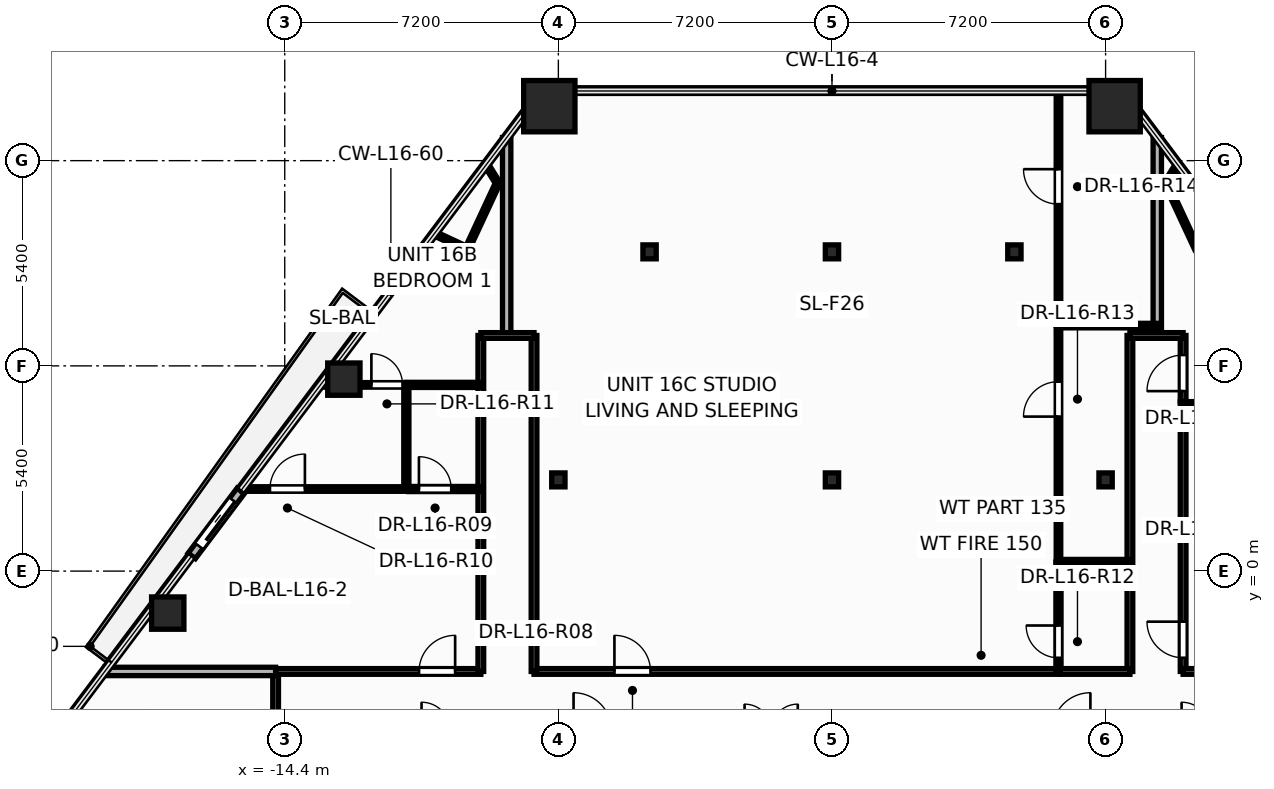
"""IFC4 building model, lengths in metres.
Left out: names, types, materials, properties, quantities, classifications, styles, units other than length and angle.
Written with IfcOpenShell. Run it as: python <this file> out.ifc"""

import sys

from ifc_helpers import new_model, si_unit, direction, frame, frame_2d, origin, origin_2d, place, context, subcontext, project, spatial, rectangle, hollow_rectangle, hollow_circle, i_section, extrude, element, fill, save


model = new_model("IFC4")
c1 = context("Model", 3, precision=1e-05, world=origin(), true_north=direction((0.0, 1.0)))
c2 = subcontext(c1, "Body", "Model", "MODEL_VIEW")
j1 = project(units=[si_unit("LENGTHUNIT", "METRE"), si_unit("PLANEANGLEUNIT", "RADIAN")], contexts=[c1])
p1 = place(None, origin())
s1 = spatial("IfcSite", under=j1, at=p1, CompositionType="ELEMENT")
p2 = place(p1, origin())
s2 = spatial("IfcBuilding", under=s1, at=p2, CompositionType="ELEMENT")
p3 = place(p2, frame((0.0, 0.0, 64.8)))
s3 = spatial("IfcBuildingStorey", under=s2, at=p3, CompositionType="ELEMENT", Elevation=64.8)
for number, where, z_axis, x_axis in (
    (1, (7.438, 12.233, 0.0), (0.0, 0.0, 1.0), (1.0, 0.0, 0.0)),
    (2, (-7.438, 12.233, 0.0), (0.0, 0.0, 1.0), (1.0, 0.0, 0.0)),
):
    element("IfcColumn", number, at=place(p3, frame(where, z_axis=z_axis, x_axis=x_axis)), inside=s3, PredefinedType="COLUMN", context=c2, shape_type="SweptSolid", body=[
        extrude(hollow_rectangle(XDim=1.35, YDim=1.35, WallThickness=0.065, at=origin_2d()), origin(), (0.0, 0.0, 1.0), 3.6),
    ])
for number, where, z_axis, x_axis in (
    (3, (-12.844, 5.051, 0.0), (0.0, 0.0, 1.0), (1.0, 0.0, 0.0)),
    (4, (-17.479, -1.104, 0.0), (0.0, 0.0, 1.0), (1.0, 0.0, 0.0)),
):
    element("IfcColumn", number, at=place(p3, frame(where, z_axis=z_axis, x_axis=x_axis)), inside=s3, PredefinedType="COLUMN", context=c2, shape_type="SweptSolid", body=[
        extrude(hollow_circle(Radius=0.425, WallThickness=0.038, at=origin_2d()), origin(), (0.0, 0.0, 1.0), 3.6),
    ])
for number, where, z_axis, x_axis in (
    (5, (-7.2, 2.4, 0.0), (0.0, 0.0, 1.0), (1.0, 0.0, 0.0)),
    (6, (0.0, 2.4, 0.0), (0.0, 0.0, 1.0), (1.0, 0.0, 0.0)),
    (7, (7.2, 2.4, 0.0), (0.0, 0.0, 1.0), (1.0, 0.0, 0.0)),
    (8, (-4.8, 8.4, 0.0), (0.0, 0.0, 1.0), (1.0, 0.0, 0.0)),
    (9, (0.0, 8.4, 0.0), (0.0, 0.0, 1.0), (1.0, 0.0, 0.0)),
    (10, (4.8, 8.4, 0.0), (0.0, 0.0, 1.0), (1.0, 0.0, 0.0)),
):
    element("IfcColumn", number, at=place(p3, frame(where, z_axis=z_axis, x_axis=x_axis)), inside=s3, PredefinedType="COLUMN", context=c2, shape_type="SweptSolid", body=[
        extrude(i_section(OverallWidth=0.35, OverallDepth=0.367, WebThickness=0.025, FlangeThickness=0.032, at=origin_2d()), origin(), (0.0, 0.0, 1.0), 3.6),
    ])
p4 = place(p3, frame((-15.559, 2.11, -0.015), z_axis=(0.0, 0.0, 1.0), x_axis=(-0.601441023505, -0.798917201746, 0.0)))
e11 = element("IfcWall", 11, at=p4, inside=s3, PredefinedType="STANDARD", context=c2, shape_type="SweptSolid", body=[
    extrude(rectangle(XDim=2.14, YDim=0.24, at=frame_2d((1.07, 0.0))), origin(), (0.0, 0.0, 1.0), 2.729),
])
p5 = place(p4, frame((0.32, 0.0, 0.015)))
e12 = element("IfcOpeningElement", 12, at=p5, cuts=e11, PredefinedType="OPENING", context=c2, shape_type="SweptSolid", body=[
    extrude(rectangle(XDim=1.506, YDim=2.204, at=frame_2d((0.75, 1.102))), frame((0.0, 0.13, 0.0), z_axis=(0.0, -1.0, 0.0), x_axis=(1.0, 0.0, 0.0)), (0.0, 0.0, 1.0), 0.26),
])
p6 = place(p3, frame((-7.84, -2.64, 0.0), z_axis=(0.0, 0.0, 1.0), x_axis=(1.0, 0.0, 0.0)))
e13 = element("IfcWall", 13, at=p6, inside=s3, PredefinedType="PARTITIONING", context=c2, shape_type="SweptSolid", body=[
    extrude(rectangle(XDim=13.84, YDim=0.15, at=frame_2d((6.92, 0.0))), origin(), (0.0, 0.0, 1.0), 2.325),
])
p7 = place(p6, frame((2.115, 0.0, 0.0)))
e14 = element("IfcOpeningElement", 14, at=p7, cuts=e13, PredefinedType="OPENING", context=c2, shape_type="SweptSolid", body=[
    extrude(rectangle(XDim=0.956, YDim=2.104, at=frame_2d((0.475, 1.052))), frame((0.0, 0.085, 0.0), z_axis=(0.0, -1.0, 0.0), x_axis=(1.0, 0.0, 0.0)), (0.0, 0.0, 1.0), 0.17),
])
p8 = place(p3, frame((-7.84, -2.64, 0.0), z_axis=(0.0, 0.0, 1.0), x_axis=(0.0, 1.0, 0.0)))
e15 = element("IfcWall", 15, at=p8, inside=s3, PredefinedType="PARTITIONING", context=c2, shape_type="SweptSolid", body=[
    extrude(rectangle(XDim=8.84, YDim=0.15, at=frame_2d((4.42, 0.0))), origin(), (0.0, 0.0, 1.0), 2.325),
])
p9 = place(p3, frame((9.24, -2.64, 0.0), z_axis=(0.0, 0.0, 1.0), x_axis=(0.0, 1.0, 0.0)))
e16 = element("IfcWall", 16, at=p9, inside=s3, PredefinedType="PARTITIONING", context=c2, shape_type="SweptSolid", body=[
    extrude(rectangle(XDim=7.1, YDim=0.15, at=frame_2d((3.55, 0.0))), origin(), (0.0, 0.0, 1.0), 2.325),
])
p10 = place(p9, frame((0.36, 0.0, 0.0)))
e17 = element("IfcOpeningElement", 17, at=p10, cuts=e16, PredefinedType="OPENING", context=c2, shape_type="SweptSolid", body=[
    extrude(rectangle(XDim=0.956, YDim=2.104, at=frame_2d((0.475, 1.052))), frame((0.0, 0.085, 0.0), z_axis=(0.0, -1.0, 0.0), x_axis=(1.0, 0.0, 0.0)), (0.0, 0.0, 1.0), 0.17),
])
p11 = place(p3, frame((-14.64, -9.66, 0.0), z_axis=(0.0, 0.0, 1.0), x_axis=(0.0, 1.0, 0.0)))
e18 = element("IfcWall", 18, at=p11, inside=s3, PredefinedType="PARTITIONING", context=c2, shape_type="SweptSolid", body=[
    extrude(rectangle(XDim=7.02, YDim=0.15, at=frame_2d((3.51, 0.0))), origin(), (0.0, 0.0, 1.0), 2.325),
])
p12 = place(p11, frame((0.399, 0.0, 0.0)))
e19 = element("IfcOpeningElement", 19, at=p12, cuts=e18, PredefinedType="OPENING", context=c2, shape_type="SweptSolid", body=[
    extrude(rectangle(XDim=0.956, YDim=2.104, at=frame_2d((0.475, 1.052))), frame((0.0, 0.085, 0.0), z_axis=(0.0, -1.0, 0.0), x_axis=(1.0, 0.0, 0.0)), (0.0, 0.0, 1.0), 0.17),
])
p13 = place(p3, frame((5.96, 0.24, 0.0), z_axis=(0.0, 0.0, 1.0), x_axis=(0.0, 1.0, 0.0)))
e20 = element("IfcWall", 20, at=p13, inside=s3, PredefinedType="PARTITIONING", context=c2, shape_type="SweptSolid", body=[
    extrude(rectangle(XDim=6.22, YDim=0.12, at=frame_2d((3.11, 0.0))), origin(), (0.0, 0.0, 1.0), 2.325),
])
p14 = place(p13, frame((3.825, 0.0, 0.0)))
e21 = element("IfcOpeningElement", 21, at=p14, cuts=e20, PredefinedType="OPENING", context=c2, shape_type="SweptSolid", body=[
    extrude(rectangle(XDim=0.926, YDim=2.104, at=frame_2d((0.46, 1.052))), frame((0.0, 0.07, 0.0), z_axis=(0.0, -1.0, 0.0), x_axis=(1.0, 0.0, 0.0)), (0.0, 0.0, 1.0), 0.14),
])
p15 = place(p3, frame((5.96, 6.46, 0.0), z_axis=(0.0, 0.0, 1.0), x_axis=(0.0, 1.0, 0.0)))
e22 = element("IfcWall", 22, at=p15, inside=s3, PredefinedType="PARTITIONING", context=c2, shape_type="SweptSolid", body=[
    extrude(rectangle(XDim=6.173, YDim=0.12, at=frame_2d((3.087, 0.0))), origin(), (0.0, 0.0, 1.0), 2.325),
])
p16 = place(p15, frame((3.196, 0.0, 0.0)))
e23 = element("IfcOpeningElement", 23, at=p16, cuts=e22, PredefinedType="OPENING", context=c2, shape_type="SweptSolid", body=[
    extrude(rectangle(XDim=0.926, YDim=2.104, at=frame_2d((0.46, 1.052))), frame((0.0, 0.07, 0.0), z_axis=(0.0, -1.0, 0.0), x_axis=(1.0, 0.0, 0.0)), (0.0, 0.0, 1.0), 0.14),
])
p17 = place(p3, frame((7.84, -2.64, 0.0), z_axis=(0.0, 0.0, 1.0), x_axis=(0.0, 1.0, 0.0)))
e24 = element("IfcWall", 24, at=p17, inside=s3, PredefinedType="PARTITIONING", context=c2, shape_type="SweptSolid", body=[
    extrude(rectangle(XDim=8.84, YDim=0.15, at=frame_2d((4.42, 0.0))), origin(), (0.0, 0.0, 1.0), 2.325),
])
p18 = place(p3, frame((-14.64, -2.64, 0.0), z_axis=(0.0, 0.0, 1.0), x_axis=(1.0, 0.0, 0.0)))
e25 = element("IfcWall", 25, at=p18, inside=s3, PredefinedType="PARTITIONING", context=c2, shape_type="SweptSolid", body=[
    extrude(rectangle(XDim=5.4, YDim=0.15, at=frame_2d((2.7, 0.0))), origin(), (0.0, 0.0, 1.0), 3.35),
])
p19 = place(p18, frame((3.774, 0.0, 0.0)))
e26 = element("IfcOpeningElement", 26, at=p19, cuts=e25, PredefinedType="OPENING", context=c2, shape_type="SweptSolid", body=[
    extrude(rectangle(XDim=0.956, YDim=2.104, at=frame_2d((0.475, 1.052))), frame((0.0, 0.085, 0.0), z_axis=(0.0, -1.0, 0.0), x_axis=(1.0, 0.0, 0.0)), (0.0, 0.0, 1.0), 0.17),
])
for number, where, z_axis, x_axis in (
    (27, (-8.56, 6.2, 0.0), (0.0, 0.0, 1.0), (0.0, 1.0, 0.0)),
    (28, (8.56, 6.2, 0.0), (0.0, 0.0, 1.0), (0.0, 1.0, 0.0)),
):
    element("IfcWall", number, at=place(p3, frame(where, z_axis=z_axis, x_axis=x_axis)), inside=s3, PredefinedType="PARTITIONING", context=c2, shape_type="SweptSolid", body=[
        extrude(rectangle(XDim=5.208, YDim=0.22, at=frame_2d((2.604, 0.0))), origin(), (0.0, 0.0, 1.0), 2.325),
    ])
p20 = place(p3, frame((-9.24, -2.64, 0.0), z_axis=(0.0, 0.0, 1.0), x_axis=(0.0, 1.0, 0.0)))
e29 = element("IfcWall", 29, at=p20, inside=s3, PredefinedType="PARTITIONING", context=c2, shape_type="SweptSolid", body=[
    extrude(rectangle(XDim=8.84, YDim=0.15, at=frame_2d((4.42, 0.0))), origin(), (0.0, 0.0, 1.0), 2.325),
])
p21 = place(p3, frame((9.24, 4.4, 0.0), z_axis=(0.0, 0.0, 1.0), x_axis=(1.0, 0.0, 0.0)))
e30 = element("IfcWall", 30, at=p21, inside=s3, PredefinedType="PARTITIONING", context=c2, shape_type="SweptSolid", body=[
    extrude(rectangle(XDim=4.595, YDim=0.12, at=frame_2d((2.298, 0.0))), origin(), (0.0, 0.0, 1.0), 2.713),
])
p22 = place(p3, frame((-19.135, -2.64, 0.0), z_axis=(0.0, 0.0, 1.0), x_axis=(1.0, 0.0, 0.0)))
e31 = element("IfcWall", 31, at=p22, inside=s3, PredefinedType="PARTITIONING", context=c2, shape_type="SweptSolid", body=[
    extrude(rectangle(XDim=4.495, YDim=0.22, at=frame_2d((2.248, 0.0))), origin(), (0.0, 0.0, 1.0), 2.713),
])
p23 = place(p3, frame((-15.522, 2.16, 0.0), z_axis=(0.0, 0.0, 1.0), x_axis=(1.0, 0.0, 0.0)))
e32 = element("IfcWall", 32, at=p23, inside=s3, PredefinedType="PARTITIONING", context=c2, shape_type="SweptSolid", body=[
    extrude(rectangle(XDim=4.382, YDim=0.12, at=frame_2d((2.191, 0.0))), origin(), (0.0, 0.0, 1.0), 2.713),
])
p24 = place(p23, frame((0.732, 0.0, 0.0)))
e33 = element("IfcOpeningElement", 33, at=p24, cuts=e32, PredefinedType="OPENING", context=c2, shape_type="SweptSolid", body=[
    extrude(rectangle(XDim=0.926, YDim=2.104, at=frame_2d((0.46, 1.052))), frame((0.0, 0.07, 0.0), z_axis=(0.0, -1.0, 0.0), x_axis=(1.0, 0.0, 0.0)), (0.0, 0.0, 1.0), 0.14),
])
p25 = place(p3, frame((9.24, -2.64, 0.0), z_axis=(0.0, 0.0, 1.0), x_axis=(1.0, 0.0, 0.0)))
e34 = element("IfcWall", 34, at=p25, inside=s3, PredefinedType="PARTITIONING", context=c2, shape_type="SweptSolid", body=[
    extrude(rectangle(XDim=3.26, YDim=0.15, at=frame_2d((1.63, 0.0))), origin(), (0.0, 0.0, 1.0), 3.35),
])
p26 = place(p3, frame((5.96, -2.64, 0.0), z_axis=(0.0, 0.0, 1.0), x_axis=(0.0, 1.0, 0.0)))
e35 = element("IfcWall", 35, at=p26, inside=s3, PredefinedType="PARTITIONING", context=c2, shape_type="SweptSolid", body=[
    extrude(rectangle(XDim=2.88, YDim=0.135, at=frame_2d((1.44, 0.0))), origin(), (0.0, 0.0, 1.0), 3.35),
])
p27 = place(p26, frame((0.359, 0.0, 0.0)))
e36 = element("IfcOpeningElement", 36, at=p27, cuts=e35, PredefinedType="OPENING", context=c2, shape_type="SweptSolid", body=[
    extrude(rectangle(XDim=0.856, YDim=2.104, at=frame_2d((0.425, 1.052))), frame((0.0, 0.078, 0.0), z_axis=(0.0, -1.0, 0.0), x_axis=(1.0, 0.0, 0.0)), (0.0, 0.0, 1.0), 0.155),
])
p28 = place(p3, frame((-11.2, 2.16, 0.0), z_axis=(0.0, 0.0, 1.0), x_axis=(0.0, 1.0, 0.0)))
e37 = element("IfcWall", 37, at=p28, inside=s3, PredefinedType="PARTITIONING", context=c2, shape_type="SweptSolid", body=[
    extrude(rectangle(XDim=2.74, YDim=0.135, at=frame_2d((1.37, 0.0))), origin(), (0.0, 0.0, 1.0), 3.35),
])
p29 = place(p3, frame((5.96, 6.46, 0.0), z_axis=(0.0, 0.0, 1.0), x_axis=(1.0, 0.0, 0.0)))
e38 = element("IfcWall", 38, at=p29, inside=s3, PredefinedType="PARTITIONING", context=c2, shape_type="SweptSolid", body=[
    extrude(rectangle(XDim=2.6, YDim=0.12, at=frame_2d((1.3, 0.0))), origin(), (0.0, 0.0, 1.0), 3.35),
])
p30 = place(p3, frame((-13.459, 4.9, 0.0), z_axis=(0.0, 0.0, 1.0), x_axis=(1.0, 0.0, 0.0)))
e39 = element("IfcWall", 39, at=p30, inside=s3, PredefinedType="PARTITIONING", context=c2, shape_type="SweptSolid", body=[
    extrude(rectangle(XDim=2.259, YDim=0.12, at=frame_2d((1.129, 0.0))), origin(), (0.0, 0.0, 1.0), 2.325),
])
p31 = place(p30, frame((1.339, 0.0, 0.0)))
e40 = element("IfcOpeningElement", 40, at=p31, cuts=e39, PredefinedType="OPENING", context=c2, shape_type="SweptSolid", body=[
    extrude(rectangle(XDim=0.826, YDim=2.104, at=frame_2d((0.41, 1.052))), frame((0.0, 0.07, 0.0), z_axis=(0.0, -1.0, 0.0), x_axis=(1.0, 0.0, 0.0)), (0.0, 0.0, 1.0), 0.14),
])
p32 = place(p3, frame((-11.138, 2.16, 0.0), z_axis=(0.0, 0.0, 1.0), x_axis=(1.0, 0.0, 0.0)))
e41 = element("IfcWall", 41, at=p32, inside=s3, PredefinedType="PARTITIONING", context=c2, shape_type="SweptSolid", body=[
    extrude(rectangle(XDim=1.898, YDim=0.135, at=frame_2d((0.949, 0.0))), origin(), (0.0, 0.0, 1.0), 3.35),
])
p33 = place(p32, frame((0.269, 0.0, 0.0)))
e42 = element("IfcOpeningElement", 42, at=p33, cuts=e41, PredefinedType="OPENING", context=c2, shape_type="SweptSolid", body=[
    extrude(rectangle(XDim=0.856, YDim=2.104, at=frame_2d((0.425, 1.052))), frame((0.0, 0.078, 0.0), z_axis=(0.0, -1.0, 0.0), x_axis=(1.0, 0.0, 0.0)), (0.0, 0.0, 1.0), 0.155),
])
p34 = place(p3, frame((6.002, -2.64, 0.0), z_axis=(0.0, 0.0, 1.0), x_axis=(1.0, 0.0, 0.0)))
e43 = element("IfcWall", 43, at=p34, inside=s3, PredefinedType="PARTITIONING", context=c2, shape_type="SweptSolid", body=[
    extrude(rectangle(XDim=1.838, YDim=0.15, at=frame_2d((0.919, 0.0))), origin(), (0.0, 0.0, 1.0), 2.325),
])
p35 = place(p3, frame((-11.2, 4.9, 0.0), z_axis=(0.0, 0.0, 1.0), x_axis=(1.0, 0.0, 0.0)))
e44 = element("IfcWall", 44, at=p35, inside=s3, PredefinedType="PARTITIONING", context=c2, shape_type="SweptSolid", body=[
    extrude(rectangle(XDim=1.96, YDim=0.135, at=frame_2d((0.98, 0.0))), origin(), (0.0, 0.0, 1.0), 3.35),
])
for number, where, z_axis, x_axis in (
    (45, (-8.795, 10.21, 0.0), (0.0, 0.0, 1.0), (-0.422, -0.907, 0.0)),
    (46, (9.6, 8.479, 0.0), (0.0, 0.0, 1.0), (-0.422, 0.907, 0.0)),
):
    element("IfcWall", number, at=place(p3, frame(where, z_axis=z_axis, x_axis=x_axis)), inside=s3, PredefinedType="PARTITIONING", context=c2, shape_type="SweptSolid", body=[
        extrude(rectangle(XDim=1.909, YDim=0.12, at=frame_2d((0.955, 0.0))), origin(), (0.0, 0.0, 1.0), 3.35),
    ])
p36 = place(p3, frame((5.96, 0.24, 0.0), z_axis=(0.0, 0.0, 1.0), x_axis=(1.0, 0.0, 0.0)))
e47 = element("IfcWall", 47, at=p36, inside=s3, PredefinedType="PARTITIONING", context=c2, shape_type="SweptSolid", body=[
    extrude(rectangle(XDim=1.88, YDim=0.135, at=frame_2d((0.94, 0.0))), origin(), (0.0, 0.0, 1.0), 2.325),
])
p37 = place(p3, frame((9.24, 4.462, 0.0), z_axis=(0.0, 0.0, 1.0), x_axis=(0.0, 1.0, 0.0)))
e48 = element("IfcWall", 48, at=p37, inside=s3, PredefinedType="PARTITIONING", context=c2, shape_type="SweptSolid", body=[
    extrude(rectangle(XDim=1.738, YDim=0.15, at=frame_2d((0.869, 0.0))), origin(), (0.0, 0.0, 1.0), 3.35),
])
p38 = place(p37, frame((0.274, 0.0, 0.0)))
e49 = element("IfcOpeningElement", 49, at=p38, cuts=e48, PredefinedType="OPENING", context=c2, shape_type="SweptSolid", body=[
    extrude(rectangle(XDim=0.956, YDim=2.104, at=frame_2d((0.475, 1.052))), frame((0.0, 0.085, 0.0), z_axis=(0.0, -1.0, 0.0), x_axis=(1.0, 0.0, 0.0)), (0.0, 0.0, 1.0), 0.17),
])
p39 = place(p3, frame((-9.6, 8.479, 0.0), z_axis=(0.0, 0.0, 1.0), x_axis=(-0.906732650515, 0.421705940781, 0.0)))
e50 = element("IfcWall", 50, at=p39, inside=s3, PredefinedType="PARTITIONING", context=c2, shape_type="SweptSolid", body=[
    extrude(rectangle(XDim=0.941, YDim=0.12, at=frame_2d((0.47, 0.0))), origin(), (0.0, 0.0, 1.0), 2.713),
])
for number, where, z_axis, x_axis in (
    (51, (7.84, 6.2, 0.0), (0.0, 0.0, 1.0), (1.0, 0.0, 0.0)),
    (52, (-9.24, 6.2, 0.0), (0.0, 0.0, 1.0), (1.0, 0.0, 0.0)),
):
    element("IfcWall", number, at=place(p3, frame(where, z_axis=z_axis, x_axis=x_axis)), inside=s3, PredefinedType="PARTITIONING", context=c2, shape_type="SweptSolid", body=[
        extrude(rectangle(XDim=1.4, YDim=0.15, at=frame_2d((0.7, 0.0))), origin(), (0.0, 0.0, 1.0), 3.35),
    ])
for number, where, z_axis, x_axis in (
    (53, (-9.091, 10.686, 0.0), (0.0, 0.0, 1.0), (0.528, -0.849, 0.0)),
    (54, (8.795, 10.21, 0.0), (0.0, 0.0, 1.0), (0.528, 0.849, 0.0)),
):
    element("IfcWall", number, at=place(p3, frame(where, z_axis=z_axis, x_axis=x_axis)), inside=s3, PredefinedType="PARTITIONING", context=c2, shape_type="SweptSolid", body=[
        extrude(rectangle(XDim=0.56, YDim=0.12, at=frame_2d((0.28, 0.0))), origin(), (0.0, 0.0, 1.0), 2.713),
    ])
p40 = place(p5, origin())
e55 = element("IfcDoor", 55, at=p40, inside=s3, OperationType="SLIDING_TO_RIGHT", PredefinedType="DOOR", context=c2, shape_type="SweptSolid", body=[
    extrude(rectangle(XDim=1.5, YDim=2.2, at=frame_2d((0.75, 1.1))), frame((0.0, 0.025, 0.0), z_axis=(0.0, -1.0, 0.0), x_axis=(1.0, 0.0, 0.0)), (0.0, 0.0, 1.0), 0.05),
])
fill(e12, e55)
p41 = place(p19, origin())
e56 = element("IfcDoor", 56, at=p41, inside=s3, OperationType="SINGLE_SWING_RIGHT", PredefinedType="DOOR", context=c2, shape_type="SweptSolid", body=[
    extrude(rectangle(XDim=0.95, YDim=2.1, at=frame_2d((0.475, 1.05))), frame((0.0, 0.025, 0.0), z_axis=(0.0, -1.0, 0.0), x_axis=(1.0, 0.0, 0.0)), (0.0, 0.0, 1.0), 0.05),
])
fill(e26, e56)
p42 = place(p33, origin())
e57 = element("IfcDoor", 57, at=p42, inside=s3, OperationType="SINGLE_SWING_LEFT", PredefinedType="DOOR", context=c2, shape_type="SweptSolid", body=[
    extrude(rectangle(XDim=0.85, YDim=2.1, at=frame_2d((0.425, 1.05))), frame((0.0, 0.025, 0.0), z_axis=(0.0, -1.0, 0.0), x_axis=(1.0, 0.0, 0.0)), (0.0, 0.0, 1.0), 0.05),
])
fill(e42, e57)
p43 = place(p24, origin())
e58 = element("IfcDoor", 58, at=p43, inside=s3, OperationType="SINGLE_SWING_RIGHT", PredefinedType="DOOR", context=c2, shape_type="SweptSolid", body=[
    extrude(rectangle(XDim=0.92, YDim=2.1, at=frame_2d((0.46, 1.05))), frame((0.0, 0.025, 0.0), z_axis=(0.0, -1.0, 0.0), x_axis=(1.0, 0.0, 0.0)), (0.0, 0.0, 1.0), 0.05),
])
fill(e33, e58)
p44 = place(p31, origin())
e59 = element("IfcDoor", 59, at=p44, inside=s3, OperationType="SINGLE_SWING_LEFT", PredefinedType="DOOR", context=c2, shape_type="SweptSolid", body=[
    extrude(rectangle(XDim=0.82, YDim=2.1, at=frame_2d((0.41, 1.05))), frame((0.0, 0.025, 0.0), z_axis=(0.0, -1.0, 0.0), x_axis=(1.0, 0.0, 0.0)), (0.0, 0.0, 1.0), 0.05),
])
fill(e40, e59)
p45 = place(p27, origin())
e60 = element("IfcDoor", 60, at=p45, inside=s3, OperationType="SINGLE_SWING_RIGHT", PredefinedType="DOOR", context=c2, shape_type="SweptSolid", body=[
    extrude(rectangle(XDim=0.85, YDim=2.1, at=frame_2d((0.425, 1.05))), frame((0.0, 0.025, 0.0), z_axis=(0.0, -1.0, 0.0), x_axis=(1.0, 0.0, 0.0)), (0.0, 0.0, 1.0), 0.05),
])
fill(e36, e60)
p46 = place(p14, origin())
e61 = element("IfcDoor", 61, at=p46, inside=s3, OperationType="SINGLE_SWING_LEFT", PredefinedType="DOOR", context=c2, shape_type="SweptSolid", body=[
    extrude(rectangle(XDim=0.92, YDim=2.1, at=frame_2d((0.46, 1.05))), frame((0.0, 0.025, 0.0), z_axis=(0.0, -1.0, 0.0), x_axis=(1.0, 0.0, 0.0)), (0.0, 0.0, 1.0), 0.05),
])
fill(e21, e61)
p47 = place(p16, origin())
e62 = element("IfcDoor", 62, at=p47, inside=s3, OperationType="SINGLE_SWING_RIGHT", PredefinedType="DOOR", context=c2, shape_type="SweptSolid", body=[
    extrude(rectangle(XDim=0.92, YDim=2.1, at=frame_2d((0.46, 1.05))), frame((0.0, 0.025, 0.0), z_axis=(0.0, -1.0, 0.0), x_axis=(1.0, 0.0, 0.0)), (0.0, 0.0, 1.0), 0.05),
])
fill(e23, e62)
p48 = place(p7, origin())
e63 = element("IfcDoor", 63, at=p48, inside=s3, OperationType="SINGLE_SWING_LEFT", PredefinedType="DOOR", context=c2, shape_type="SweptSolid", body=[
    extrude(rectangle(XDim=0.95, YDim=2.1, at=frame_2d((0.475, 1.05))), frame((0.0, 0.025, 0.0), z_axis=(0.0, -1.0, 0.0), x_axis=(1.0, 0.0, 0.0)), (0.0, 0.0, 1.0), 0.05),
])
fill(e14, e63)
p49 = place(p10, origin())
e64 = element("IfcDoor", 64, at=p49, inside=s3, OperationType="SINGLE_SWING_RIGHT", PredefinedType="DOOR", context=c2, shape_type="SweptSolid", body=[
    extrude(rectangle(XDim=0.95, YDim=2.1, at=frame_2d((0.475, 1.05))), frame((0.0, 0.025, 0.0), z_axis=(0.0, -1.0, 0.0), x_axis=(1.0, 0.0, 0.0)), (0.0, 0.0, 1.0), 0.05),
])
fill(e17, e64)
p50 = place(p38, origin())
e65 = element("IfcDoor", 65, at=p50, inside=s3, OperationType="SINGLE_SWING_LEFT", PredefinedType="DOOR", context=c2, shape_type="SweptSolid", body=[
    extrude(rectangle(XDim=0.95, YDim=2.1, at=frame_2d((0.475, 1.05))), frame((0.0, 0.025, 0.0), z_axis=(0.0, -1.0, 0.0), x_axis=(1.0, 0.0, 0.0)), (0.0, 0.0, 1.0), 0.05),
])
fill(e49, e65)
save(model, sys.argv[1])
